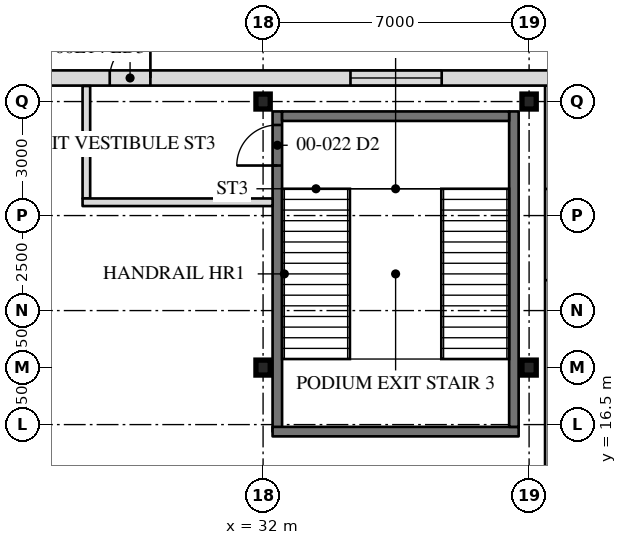
"""IFC4 building model, lengths in metres.
Left out: names, types, materials, properties, quantities, classifications, styles, units other than length and angle.
Written with IfcOpenShell. Run it as: python <this file> out.ifc"""

import sys

from ifc_helpers import new_model, si_unit, direction, frame, frame_2d, origin, origin_2d, place, context, subcontext, project, spatial, rectangle, i_section, extrude, element, fill, save


model = new_model("IFC4")
c1 = context("Model", 3, precision=1e-05, world=origin(), true_north=direction((0.0, 1.0)))
c2 = subcontext(c1, "Body", "Model", "MODEL_VIEW")
j1 = project(units=[si_unit("LENGTHUNIT", "METRE"), si_unit("PLANEANGLEUNIT", "RADIAN")], contexts=[c1])
p1 = place(None, origin())
s1 = spatial("IfcSite", under=j1, at=p1, CompositionType="ELEMENT")
p2 = place(p1, origin())
s2 = spatial("IfcBuilding", under=s1, at=p2, CompositionType="ELEMENT")
p3 = place(p2, origin())
s3 = spatial("IfcBuildingStorey", under=s2, at=p3, CompositionType="ELEMENT", Elevation=0.0)
for number, where, z_axis, x_axis in (
    (1, (32.0, 18.0, -0.3), (0.0, 0.0, 1.0), (0.0, 1.0, 0.0)),
    (2, (32.0, 25.0, -0.3), (0.0, 0.0, 1.0), (0.0, 1.0, 0.0)),
    (3, (39.0, 18.0, -0.3), (0.0, 0.0, 1.0), (0.0, 1.0, 0.0)),
    (4, (39.0, 25.0, -0.3), (0.0, 0.0, 1.0), (0.0, 1.0, 0.0)),
):
    element("IfcColumn", number, at=place(p3, frame(where, z_axis=z_axis, x_axis=x_axis)), inside=s3, PredefinedType="COLUMN", context=c2, shape_type="SweptSolid", body=[
        extrude(i_section(OverallWidth=0.394, OverallDepth=0.376, WebThickness=0.017, FlangeThickness=0.028, at=origin_2d()), origin(), (0.0, 0.0, 1.0), 6.3),
    ])
p4 = place(p3, frame((39.62, -25.42, -0.3), z_axis=(0.0, 0.0, 1.0), x_axis=(0.0, 1.0, 0.0)))
e5 = element("IfcWall", 5, at=p4, inside=s3, PredefinedType="SOLIDWALL", context=c2, shape_type="SweptSolid", body=[
    extrude(rectangle(XDim=50.84, YDim=0.4, at=frame_2d((25.42, 0.0))), origin(), (0.0, 0.0, 1.0), 6.11),
])
p5 = place(p4, frame((2.72, 0.0, 1.2)))
e6 = element("IfcOpeningElement", 6, at=p5, cuts=e5, PredefinedType="OPENING", context=c2, shape_type="SweptSolid", body=[
    extrude(rectangle(XDim=2.4, YDim=4.2, at=frame_2d((1.2, 2.1))), frame((0.0, 0.21, 0.0), z_axis=(0.0, -1.0, 0.0), x_axis=(1.0, 0.0, 0.0)), (0.0, 0.0, 1.0), 0.42),
])
p6 = place(p4, frame((10.385, 0.0, 0.3)))
e7 = element("IfcOpeningElement", 7, at=p6, cuts=e5, PredefinedType="OPENING", context=c2, shape_type="SweptSolid", body=[
    extrude(rectangle(XDim=1.07, YDim=2.44, at=frame_2d((0.535, 1.22))), frame((0.0, 0.21, 0.0), z_axis=(0.0, -1.0, 0.0), x_axis=(1.0, 0.0, 0.0)), (0.0, 0.0, 1.0), 0.42),
])
p7 = place(p4, frame((18.72, 0.0, 1.2)))
e8 = element("IfcOpeningElement", 8, at=p7, cuts=e5, PredefinedType="OPENING", context=c2, shape_type="SweptSolid", body=[
    extrude(rectangle(XDim=2.4, YDim=4.2, at=frame_2d((1.2, 2.1))), frame((0.0, 0.21, 0.0), z_axis=(0.0, -1.0, 0.0), x_axis=(1.0, 0.0, 0.0)), (0.0, 0.0, 1.0), 0.42),
])
p8 = place(p4, frame((29.72, 0.0, 1.2)))
e9 = element("IfcOpeningElement", 9, at=p8, cuts=e5, PredefinedType="OPENING", context=c2, shape_type="SweptSolid", body=[
    extrude(rectangle(XDim=2.4, YDim=4.2, at=frame_2d((1.2, 2.1))), frame((0.0, 0.21, 0.0), z_axis=(0.0, -1.0, 0.0), x_axis=(1.0, 0.0, 0.0)), (0.0, 0.0, 1.0), 0.42),
])
p9 = place(p4, frame((39.385, 0.0, 0.3)))
e10 = element("IfcOpeningElement", 10, at=p9, cuts=e5, PredefinedType="OPENING", context=c2, shape_type="SweptSolid", body=[
    extrude(rectangle(XDim=1.07, YDim=2.13, at=frame_2d((0.535, 1.065))), frame((0.0, 0.21, 0.0), z_axis=(0.0, -1.0, 0.0), x_axis=(1.0, 0.0, 0.0)), (0.0, 0.0, 1.0), 0.42),
])
p10 = place(p4, frame((45.72, 0.0, 1.2)))
e11 = element("IfcOpeningElement", 11, at=p10, cuts=e5, PredefinedType="OPENING", context=c2, shape_type="SweptSolid", body=[
    extrude(rectangle(XDim=2.4, YDim=4.2, at=frame_2d((1.2, 2.1))), frame((0.0, 0.21, 0.0), z_axis=(0.0, -1.0, 0.0), x_axis=(1.0, 0.0, 0.0)), (0.0, 0.0, 1.0), 0.42),
])
p11 = place(p3, frame((39.82, 25.62, -0.3), z_axis=(0.0, 0.0, 1.0), x_axis=(-1.0, 0.0, 0.0)))
e12 = element("IfcWall", 12, at=p11, inside=s3, PredefinedType="SOLIDWALL", context=c2, shape_type="SweptSolid", body=[
    extrude(rectangle(XDim=79.64, YDim=0.4, at=frame_2d((39.82, 0.0))), origin(), (0.0, 0.0, 1.0), 6.11),
])
p12 = place(p11, frame((74.12, 0.0, 1.2)))
e13 = element("IfcOpeningElement", 13, at=p12, cuts=e12, PredefinedType="OPENING", context=c2, shape_type="SweptSolid", body=[
    extrude(rectangle(XDim=2.4, YDim=4.2, at=frame_2d((1.2, 2.1))), frame((0.0, 0.21, 0.0), z_axis=(0.0, -1.0, 0.0), x_axis=(1.0, 0.0, 0.0)), (0.0, 0.0, 1.0), 0.42),
])
p13 = place(p11, frame((67.785, 0.0, 0.3)))
e14 = element("IfcOpeningElement", 14, at=p13, cuts=e12, PredefinedType="OPENING", context=c2, shape_type="SweptSolid", body=[
    extrude(rectangle(XDim=1.07, YDim=2.44, at=frame_2d((0.535, 1.22))), frame((0.0, 0.21, 0.0), z_axis=(0.0, -1.0, 0.0), x_axis=(1.0, 0.0, 0.0)), (0.0, 0.0, 1.0), 0.42),
])
p14 = place(p11, frame((60.12, 0.0, 1.2)))
e15 = element("IfcOpeningElement", 15, at=p14, cuts=e12, PredefinedType="OPENING", context=c2, shape_type="SweptSolid", body=[
    extrude(rectangle(XDim=2.4, YDim=4.2, at=frame_2d((1.2, 2.1))), frame((0.0, 0.21, 0.0), z_axis=(0.0, -1.0, 0.0), x_axis=(1.0, 0.0, 0.0)), (0.0, 0.0, 1.0), 0.42),
])
p15 = place(p11, frame((53.12, 0.0, 1.2)))
e16 = element("IfcOpeningElement", 16, at=p15, cuts=e12, PredefinedType="OPENING", context=c2, shape_type="SweptSolid", body=[
    extrude(rectangle(XDim=2.4, YDim=4.2, at=frame_2d((1.2, 2.1))), frame((0.0, 0.21, 0.0), z_axis=(0.0, -1.0, 0.0), x_axis=(1.0, 0.0, 0.0)), (0.0, 0.0, 1.0), 0.42),
])
p16 = place(p11, frame((44.405, 0.0, 0.3)))
e17 = element("IfcOpeningElement", 17, at=p16, cuts=e12, PredefinedType="OPENING", context=c2, shape_type="SweptSolid", body=[
    extrude(rectangle(XDim=1.83, YDim=2.44, at=frame_2d((0.915, 1.22))), frame((0.0, 0.21, 0.0), z_axis=(0.0, -1.0, 0.0), x_axis=(1.0, 0.0, 0.0)), (0.0, 0.0, 1.0), 0.42),
])
p17 = place(p11, frame((33.405, 0.0, 0.3)))
e18 = element("IfcOpeningElement", 18, at=p17, cuts=e12, PredefinedType="OPENING", context=c2, shape_type="SweptSolid", body=[
    extrude(rectangle(XDim=1.83, YDim=2.44, at=frame_2d((0.915, 1.22))), frame((0.0, 0.21, 0.0), z_axis=(0.0, -1.0, 0.0), x_axis=(1.0, 0.0, 0.0)), (0.0, 0.0, 1.0), 0.42),
])
p18 = place(p11, frame((24.12, 0.0, 1.2)))
e19 = element("IfcOpeningElement", 19, at=p18, cuts=e12, PredefinedType="OPENING", context=c2, shape_type="SweptSolid", body=[
    extrude(rectangle(XDim=2.4, YDim=4.2, at=frame_2d((1.2, 2.1))), frame((0.0, 0.21, 0.0), z_axis=(0.0, -1.0, 0.0), x_axis=(1.0, 0.0, 0.0)), (0.0, 0.0, 1.0), 0.42),
])
p19 = place(p11, frame((17.12, 0.0, 1.2)))
e20 = element("IfcOpeningElement", 20, at=p19, cuts=e12, PredefinedType="OPENING", context=c2, shape_type="SweptSolid", body=[
    extrude(rectangle(XDim=2.4, YDim=4.2, at=frame_2d((1.2, 2.1))), frame((0.0, 0.21, 0.0), z_axis=(0.0, -1.0, 0.0), x_axis=(1.0, 0.0, 0.0)), (0.0, 0.0, 1.0), 0.42),
])
p20 = place(p11, frame((3.12, 0.0, 1.2)))
e21 = element("IfcOpeningElement", 21, at=p20, cuts=e12, PredefinedType="OPENING", context=c2, shape_type="SweptSolid", body=[
    extrude(rectangle(XDim=2.4, YDim=4.2, at=frame_2d((1.2, 2.1))), frame((0.0, 0.21, 0.0), z_axis=(0.0, -1.0, 0.0), x_axis=(1.0, 0.0, 0.0)), (0.0, 0.0, 1.0), 0.42),
])
p21 = place(p11, frame((10.785, 0.0, 0.3)))
e22 = element("IfcOpeningElement", 22, at=p21, cuts=e12, PredefinedType="OPENING", context=c2, shape_type="SweptSolid", body=[
    extrude(rectangle(XDim=1.07, YDim=2.13, at=frame_2d((0.535, 1.065))), frame((0.0, 0.21, 0.0), z_axis=(0.0, -1.0, 0.0), x_axis=(1.0, 0.0, 0.0)), (0.0, 0.0, 1.0), 0.42),
])
p22 = place(p3, frame((32.375, 16.315, 0.0), z_axis=(0.0, 0.0, 1.0), x_axis=(0.0, 1.0, 0.0)))
e23 = element("IfcWall", 23, at=p22, inside=s3, PredefinedType="SOLIDWALL", context=c2, shape_type="SweptSolid", body=[
    extrude(rectangle(XDim=8.425, YDim=0.25, at=frame_2d((4.212, 0.0))), origin(), (0.0, 0.0, 1.0), 5.81),
])
p23 = place(p22, frame((7.001, 0.0, 0.3)))
e24 = element("IfcOpeningElement", 24, at=p23, cuts=e23, PredefinedType="OPENING", context=c2, shape_type="SweptSolid", body=[
    extrude(rectangle(XDim=1.067, YDim=2.134, at=frame_2d((0.533, 1.067))), frame((0.0, 0.135, 0.0), z_axis=(0.0, -1.0, 0.0), x_axis=(1.0, 0.0, 0.0)), (0.0, 0.0, 1.0), 0.27),
])
p24 = place(p3, frame((32.25, 16.315, 0.0), z_axis=(0.0, 0.0, 1.0), x_axis=(1.0, 0.0, 0.0)))
e25 = element("IfcWall", 25, at=p24, inside=s3, PredefinedType="SOLIDWALL", context=c2, shape_type="SweptSolid", body=[
    extrude(rectangle(XDim=6.475, YDim=0.25, at=frame_2d((3.238, 0.0))), origin(), (0.0, 0.0, 1.0), 5.81),
])
p25 = place(p3, frame((38.6, 16.44, 0.0), z_axis=(0.0, 0.0, 1.0), x_axis=(0.0, 1.0, 0.0)))
e26 = element("IfcWall", 26, at=p25, inside=s3, PredefinedType="SOLIDWALL", context=c2, shape_type="SweptSolid", body=[
    extrude(rectangle(XDim=8.3, YDim=0.25, at=frame_2d((4.15, 0.0))), origin(), (0.0, 0.0, 1.0), 5.81),
])
p26 = place(p3, frame((32.5, 24.615, 0.0), z_axis=(0.0, 0.0, 1.0), x_axis=(1.0, 0.0, 0.0)))
e27 = element("IfcWall", 27, at=p26, inside=s3, PredefinedType="SOLIDWALL", context=c2, shape_type="SweptSolid", body=[
    extrude(rectangle(XDim=5.975, YDim=0.25, at=frame_2d((2.988, 0.0))), origin(), (0.0, 0.0, 1.0), 5.81),
])
p27 = place(p3, frame((27.35, 22.45, 0.0), z_axis=(0.0, 0.0, 1.0), x_axis=(0.0, 1.0, 0.0)))
e28 = element("IfcWall", 28, at=p27, inside=s3, PredefinedType="PARTITIONING", context=c2, shape_type="SweptSolid", body=[
    extrude(rectangle(XDim=2.96, YDim=0.2, at=frame_2d((1.48, 0.0))), origin(), (0.0, 0.0, 1.0), 5.81),
])
p28 = place(p3, frame((27.25, 22.35, 0.0), z_axis=(0.0, 0.0, 1.0), x_axis=(1.0, 0.0, 0.0)))
e29 = element("IfcWall", 29, at=p28, inside=s3, PredefinedType="PARTITIONING", context=c2, shape_type="SweptSolid", body=[
    extrude(rectangle(XDim=5.0, YDim=0.2, at=frame_2d((2.5, 0.0))), origin(), (0.0, 0.0, 1.0), 5.81),
])
p29 = place(p20, origin())
e30 = element("IfcWindow", 30, at=p29, inside=s3, PartitioningType="SINGLE_PANEL", PredefinedType="WINDOW", context=c2, shape_type="SweptSolid", body=[
    extrude(rectangle(XDim=2.4, YDim=4.2, at=frame_2d((1.2, 2.1))), frame((0.0, 0.03, 0.0), z_axis=(0.0, -1.0, 0.0), x_axis=(1.0, 0.0, 0.0)), (0.0, 0.0, 1.0), 0.06),
])
fill(e21, e30)
p30 = place(p21, frame((1.07, 0.0, 0.0), z_axis=(0.0, 0.0, 1.0), x_axis=(-1.0, 0.0, 0.0)))
e31 = element("IfcDoor", 31, at=p30, inside=s3, OperationType="SINGLE_SWING_LEFT", PredefinedType="DOOR", context=c2, shape_type="SweptSolid", body=[
    extrude(rectangle(XDim=1.07, YDim=2.13, at=frame_2d((0.535, 1.065))), frame((0.0, 0.025, 0.0), z_axis=(0.0, -1.0, 0.0), x_axis=(1.0, 0.0, 0.0)), (0.0, 0.0, 1.0), 0.05),
])
fill(e22, e31)
p31 = place(p23, origin())
e32 = element("IfcDoor", 32, at=p31, inside=s3, OperationType="SINGLE_SWING_LEFT", PredefinedType="DOOR", context=c2, shape_type="SweptSolid", body=[
    extrude(rectangle(XDim=1.067, YDim=2.134, at=frame_2d((0.533, 1.067))), frame((0.0, 0.025, 0.0), z_axis=(0.0, -1.0, 0.0), x_axis=(1.0, 0.0, 0.0)), (0.0, 0.0, 1.0), 0.05),
])
fill(e24, e32)
save(model, sys.argv[1])
